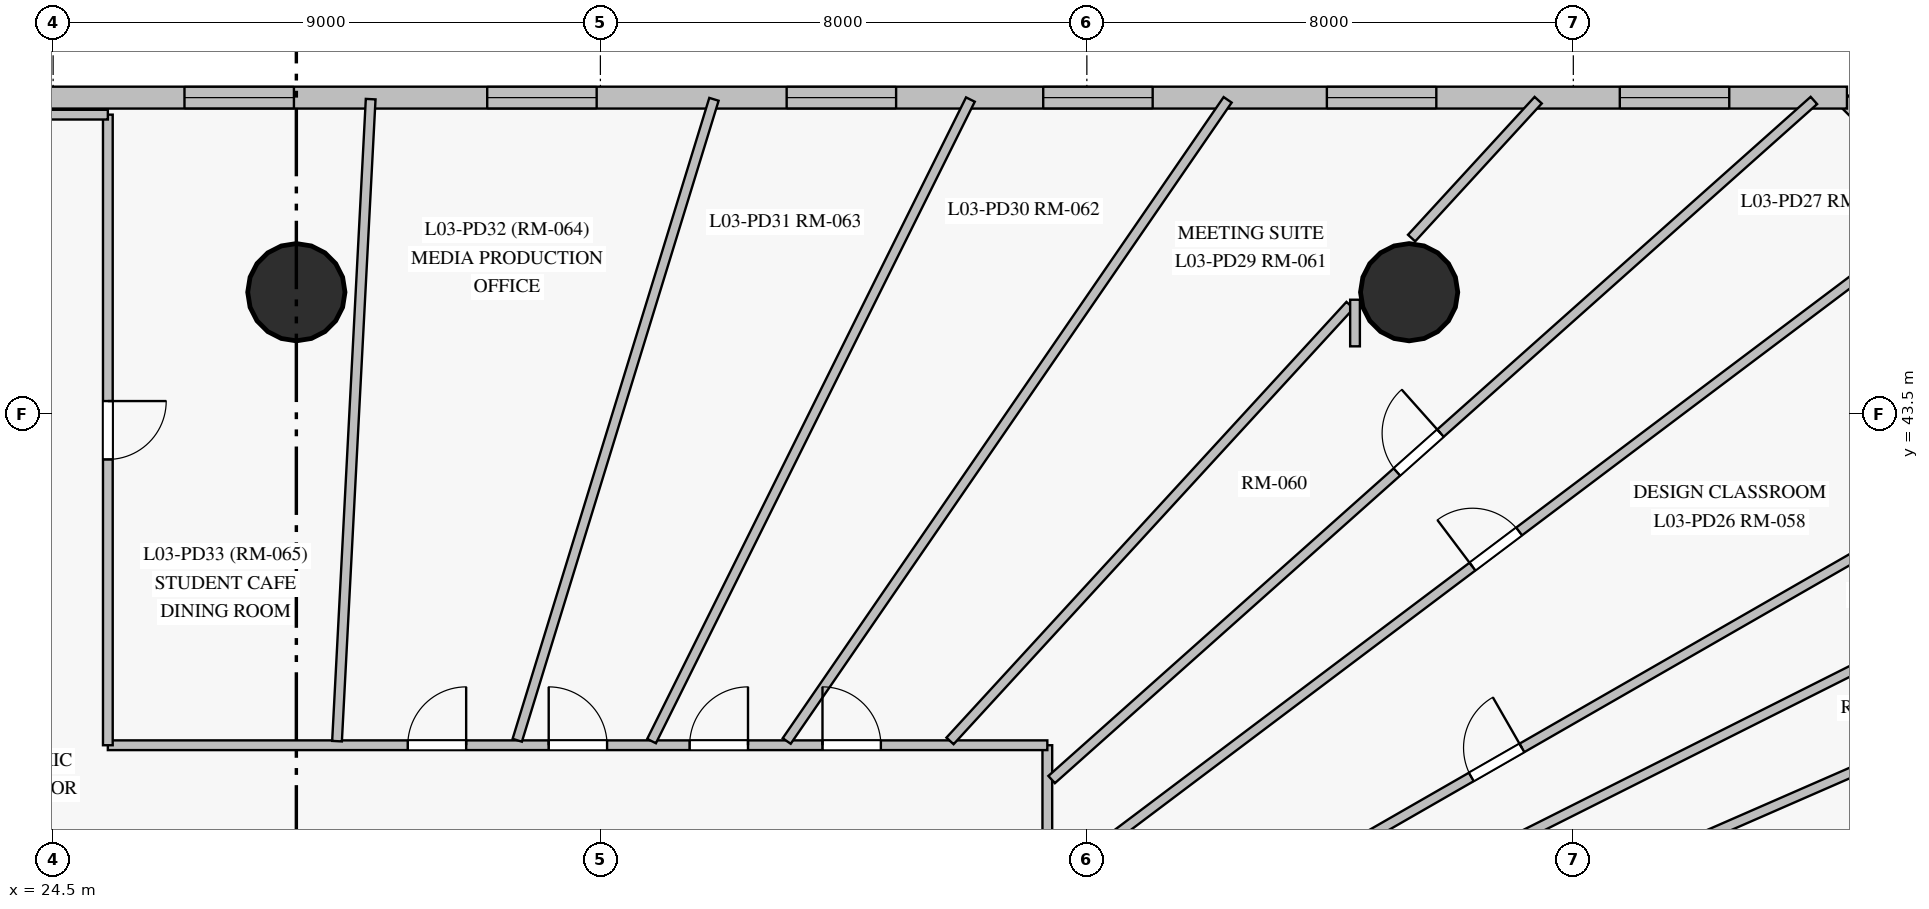
"""IFC4 building model, lengths in metres.
Left out: names, types, materials, properties, quantities, classifications, styles, units other than length and angle.
Written with IfcOpenShell. Run it as: python <this file> out.ifc"""

import sys

from ifc_helpers import new_model, si_unit, direction, frame, frame_2d, origin, origin_with_axes, origin_2d, place, context, subcontext, project, spatial, rectangle, circle, extrude, source, transform, mapped, element, fill, save


model = new_model("IFC4")
c1 = context("Model", 3, precision=1e-05, world=origin(), true_north=direction((0.0, 1.0)))
c2 = subcontext(c1, "Body", "Model", "MODEL_VIEW")
j1 = project(units=[si_unit("LENGTHUNIT", "METRE"), si_unit("PLANEANGLEUNIT", "RADIAN")], contexts=[c1])
p1 = place(None, origin())
s1 = spatial("IfcSite", under=j1, at=p1, CompositionType="ELEMENT")
p2 = place(p1, origin())
s2 = spatial("IfcBuilding", under=s1, at=p2, CompositionType="ELEMENT")
p3 = place(p2, frame((0.0, 0.0, 13.5)))
s3 = spatial("IfcBuildingStorey", under=s2, at=p3, CompositionType="ELEMENT", Elevation=13.5)
m1 = source(origin_with_axes(), c2, "Body", "SweptSolid", [
    extrude(circle(Radius=0.8, at=origin_2d()), origin(), (0.0, 0.0, 1.0), 4.5),
])
for number, where, z_axis, x_axis in (
    (1, (28.5, 45.5, 0.0), (0.0, 0.0, 1.0), (1.0, 0.0, 0.0)),
    (2, (46.8, 45.5, 0.0), (0.0, 0.0, 1.0), (1.0, 0.0, 0.0)),
):
    element("IfcColumn", number, at=place(p3, frame(where, z_axis=z_axis, x_axis=x_axis)), inside=s3, PredefinedType="COLUMN", context=c2, shape_type="MappedRepresentation", body=[
        mapped(m1, transform((0.0, 0.0, 0.0), scale=1.0)),
    ])
p4 = place(p3, frame((55.6, 47.1, 0.0), z_axis=(0.0, 0.0, 1.0), x_axis=(-0.707160727918, 0.707052830339, 0.0)))
e3 = element("IfcWall", 3, at=p4, inside=s3, PredefinedType="SOLIDWALL", context=c2, shape_type="SweptSolid", body=[
    extrude(rectangle(XDim=2.263, YDim=0.36, at=frame_2d((1.131, 0.0))), origin(), (0.0, 0.0, 1.0), 4.225),
])
p5 = place(p3, frame((54.0, 48.7, 0.0), z_axis=(0.0, 0.0, 1.0), x_axis=(-1.0, 0.0, 0.0)))
e4 = element("IfcWall", 4, at=p5, inside=s3, PredefinedType="SOLIDWALL", context=c2, shape_type="SweptSolid", body=[
    extrude(rectangle(XDim=46.8, YDim=0.36, at=frame_2d((23.4, 0.0))), origin(), (0.0, 0.0, 1.0), 4.225),
])
p6 = place(p5, frame((1.936, 0.0, 0.85)))
e5 = element("IfcOpeningElement", 5, at=p6, cuts=e4, PredefinedType="OPENING", context=c2, shape_type="SweptSolid", body=[
    extrude(rectangle(XDim=1.8, YDim=2.2, at=frame_2d((0.9, 1.1))), frame((0.0, 0.19, 0.0), z_axis=(0.0, -1.0, 0.0), x_axis=(1.0, 0.0, 0.0)), (0.0, 0.0, 1.0), 0.38),
])
p7 = place(p5, frame((6.753, 0.0, 0.85)))
e6 = element("IfcOpeningElement", 6, at=p7, cuts=e4, PredefinedType="OPENING", context=c2, shape_type="SweptSolid", body=[
    extrude(rectangle(XDim=1.8, YDim=2.2, at=frame_2d((0.9, 1.1))), frame((0.0, 0.19, 0.0), z_axis=(0.0, -1.0, 0.0), x_axis=(1.0, 0.0, 0.0)), (0.0, 0.0, 1.0), 0.38),
])
p8 = place(p5, frame((11.418, 0.0, 0.85)))
e7 = element("IfcOpeningElement", 7, at=p8, cuts=e4, PredefinedType="OPENING", context=c2, shape_type="SweptSolid", body=[
    extrude(rectangle(XDim=1.8, YDim=2.2, at=frame_2d((0.9, 1.1))), frame((0.0, 0.19, 0.0), z_axis=(0.0, -1.0, 0.0), x_axis=(1.0, 0.0, 0.0)), (0.0, 0.0, 1.0), 0.38),
])
p9 = place(p5, frame((15.637, 0.0, 0.85)))
e8 = element("IfcOpeningElement", 8, at=p9, cuts=e4, PredefinedType="OPENING", context=c2, shape_type="SweptSolid", body=[
    extrude(rectangle(XDim=1.8, YDim=2.2, at=frame_2d((0.9, 1.1))), frame((0.0, 0.19, 0.0), z_axis=(0.0, -1.0, 0.0), x_axis=(1.0, 0.0, 0.0)), (0.0, 0.0, 1.0), 0.38),
])
p10 = place(p5, frame((20.561, 0.0, 0.85)))
e9 = element("IfcOpeningElement", 9, at=p10, cuts=e4, PredefinedType="OPENING", context=c2, shape_type="SweptSolid", body=[
    extrude(rectangle(XDim=1.8, YDim=2.2, at=frame_2d((0.9, 1.1))), frame((0.0, 0.19, 0.0), z_axis=(0.0, -1.0, 0.0), x_axis=(1.0, 0.0, 0.0)), (0.0, 0.0, 1.0), 0.38),
])
p11 = place(p5, frame((25.54, 0.0, 0.85)))
e10 = element("IfcOpeningElement", 10, at=p11, cuts=e4, PredefinedType="OPENING", context=c2, shape_type="SweptSolid", body=[
    extrude(rectangle(XDim=1.8, YDim=2.2, at=frame_2d((0.9, 1.1))), frame((0.0, 0.19, 0.0), z_axis=(0.0, -1.0, 0.0), x_axis=(1.0, 0.0, 0.0)), (0.0, 0.0, 1.0), 0.38),
])
p12 = place(p5, frame((29.8, 0.0, 0.85)))
e11 = element("IfcOpeningElement", 11, at=p12, cuts=e4, PredefinedType="OPENING", context=c2, shape_type="SweptSolid", body=[
    extrude(rectangle(XDim=1.8, YDim=2.2, at=frame_2d((0.9, 1.1))), frame((0.0, 0.19, 0.0), z_axis=(0.0, -1.0, 0.0), x_axis=(1.0, 0.0, 0.0)), (0.0, 0.0, 1.0), 0.38),
])
p13 = place(p5, frame((35.709, 0.0, 0.85)))
e12 = element("IfcOpeningElement", 12, at=p13, cuts=e4, PredefinedType="OPENING", context=c2, shape_type="SweptSolid", body=[
    extrude(rectangle(XDim=1.8, YDim=2.2, at=frame_2d((0.9, 1.1))), frame((0.0, 0.19, 0.0), z_axis=(0.0, -1.0, 0.0), x_axis=(1.0, 0.0, 0.0)), (0.0, 0.0, 1.0), 0.38),
])
p14 = place(p5, frame((42.594, 0.0, 0.85)))
e13 = element("IfcOpeningElement", 13, at=p14, cuts=e4, PredefinedType="OPENING", context=c2, shape_type="SweptSolid", body=[
    extrude(rectangle(XDim=1.8, YDim=2.2, at=frame_2d((0.9, 1.1))), frame((0.0, 0.19, 0.0), z_axis=(0.0, -1.0, 0.0), x_axis=(1.0, 0.0, 0.0)), (0.0, 0.0, 1.0), 0.38),
])
p15 = place(p3, frame((40.85, 38.05, 0.0), z_axis=(0.0, 0.0, 1.0), x_axis=(0.0, -1.0, 0.0)))
e14 = element("IfcWall", 14, at=p15, inside=s3, PredefinedType="PARTITIONING", context=c2, shape_type="SweptSolid", body=[
    extrude(rectangle(XDim=18.508, YDim=0.16, at=frame_2d((9.254, 0.0))), origin(), (0.0, 0.0, 1.0), 3.275),
])
p16 = place(p15, frame((12.94, 0.0, 0.0)))
e15 = element("IfcOpeningElement", 15, at=p16, cuts=e14, PredefinedType="OPENING", context=c2, shape_type="SweptSolid", body=[
    extrude(rectangle(XDim=0.96, YDim=2.15, at=frame_2d((0.48, 1.075))), frame((0.0, 0.09, 0.0), z_axis=(0.0, -1.0, 0.0), x_axis=(1.0, 0.0, 0.0)), (0.0, 0.0, 1.0), 0.18),
])
p17 = place(p15, frame((11.006, 0.0, 0.0)))
e16 = element("IfcOpeningElement", 16, at=p17, cuts=e14, PredefinedType="OPENING", context=c2, shape_type="SweptSolid", body=[
    extrude(rectangle(XDim=0.96, YDim=2.15, at=frame_2d((0.48, 1.075))), frame((0.0, 0.09, 0.0), z_axis=(0.0, -1.0, 0.0), x_axis=(1.0, 0.0, 0.0)), (0.0, 0.0, 1.0), 0.18),
])
p18 = place(p15, frame((8.695, 0.0, 0.0)))
e17 = element("IfcOpeningElement", 17, at=p18, cuts=e14, PredefinedType="OPENING", context=c2, shape_type="SweptSolid", body=[
    extrude(rectangle(XDim=0.96, YDim=2.15, at=frame_2d((0.48, 1.075))), frame((0.0, 0.09, 0.0), z_axis=(0.0, -1.0, 0.0), x_axis=(1.0, 0.0, 0.0)), (0.0, 0.0, 1.0), 0.18),
])
p19 = place(p15, frame((6.434, 0.0, 0.0)))
e18 = element("IfcOpeningElement", 18, at=p19, cuts=e14, PredefinedType="OPENING", context=c2, shape_type="SweptSolid", body=[
    extrude(rectangle(XDim=0.96, YDim=2.15, at=frame_2d((0.48, 1.075))), frame((0.0, 0.09, 0.0), z_axis=(0.0, -1.0, 0.0), x_axis=(1.0, 0.0, 0.0)), (0.0, 0.0, 1.0), 0.18),
])
p20 = place(p15, frame((3.02, 0.0, 0.0)))
e19 = element("IfcOpeningElement", 19, at=p20, cuts=e14, PredefinedType="OPENING", context=c2, shape_type="SweptSolid", body=[
    extrude(rectangle(XDim=0.96, YDim=2.15, at=frame_2d((0.48, 1.075))), frame((0.0, 0.09, 0.0), z_axis=(0.0, -1.0, 0.0), x_axis=(1.0, 0.0, 0.0)), (0.0, 0.0, 1.0), 0.18),
])
p21 = place(p3, frame((40.92, 35.776, 0.0), z_axis=(0.0, 0.0, 1.0), x_axis=(0.798876492125, 0.601495095848, 0.0)))
e20 = element("IfcWall", 20, at=p21, inside=s3, PredefinedType="PARTITIONING", context=c2, shape_type="SweptSolid", body=[
    extrude(rectangle(XDim=18.328, YDim=0.16, at=frame_2d((9.164, 0.0))), origin(), (0.0, 0.0, 1.0), 4.225),
])
p22 = place(p21, frame((8.664, 0.0, 0.0)))
e21 = element("IfcOpeningElement", 21, at=p22, cuts=e20, PredefinedType="OPENING", context=c2, shape_type="SweptSolid", body=[
    extrude(rectangle(XDim=0.96, YDim=2.15, at=frame_2d((0.48, 1.075))), frame((0.0, 0.09, 0.0), z_axis=(0.0, -1.0, 0.0), x_axis=(1.0, 0.0, 0.0)), (0.0, 0.0, 1.0), 0.18),
])
p23 = place(p3, frame((40.932, 33.571, 0.0), z_axis=(0.0, 0.0, 1.0), x_axis=(0.867157652111, 0.498033740207, 0.0)))
e22 = element("IfcWall", 22, at=p23, inside=s3, PredefinedType="PARTITIONING", context=c2, shape_type="SweptSolid", body=[
    extrude(rectangle(XDim=16.876, YDim=0.16, at=frame_2d((8.438, 0.0))), origin(), (0.0, 0.0, 1.0), 4.225),
])
p24 = place(p23, frame((7.946, 0.0, 0.0)))
e23 = element("IfcOpeningElement", 23, at=p24, cuts=e22, PredefinedType="OPENING", context=c2, shape_type="SweptSolid", body=[
    extrude(rectangle(XDim=0.96, YDim=2.15, at=frame_2d((0.48, 1.075))), frame((0.0, 0.09, 0.0), z_axis=(0.0, -1.0, 0.0), x_axis=(1.0, 0.0, 0.0)), (0.0, 0.0, 1.0), 0.18),
])
p25 = place(p3, frame((40.921, 37.485, 0.0), z_axis=(0.0, 0.0, 1.0), x_axis=(0.746657873384, 0.665208253191, 0.0)))
e24 = element("IfcWall", 24, at=p25, inside=s3, PredefinedType="PARTITIONING", context=c2, shape_type="SweptSolid", body=[
    extrude(rectangle(XDim=16.789, YDim=0.16, at=frame_2d((8.394, 0.0))), origin(), (0.0, 0.0, 1.0), 4.225),
])
p26 = place(p25, frame((7.604, 0.0, 0.0)))
e25 = element("IfcOpeningElement", 25, at=p26, cuts=e24, PredefinedType="OPENING", context=c2, shape_type="SweptSolid", body=[
    extrude(rectangle(XDim=0.96, YDim=2.15, at=frame_2d((0.48, 1.075))), frame((0.0, 0.09, 0.0), z_axis=(0.0, -1.0, 0.0), x_axis=(1.0, 0.0, 0.0)), (0.0, 0.0, 1.0), 0.18),
])
p27 = place(p3, frame((40.932, 32.677, 0.0), z_axis=(0.0, 0.0, 1.0), x_axis=(0.893608855562, 0.448846536425, 0.0)))
e26 = element("IfcWall", 26, at=p27, inside=s3, PredefinedType="PARTITIONING", context=c2, shape_type="SweptSolid", body=[
    extrude(rectangle(XDim=16.379, YDim=0.16, at=frame_2d((8.189, 0.0))), origin(), (0.0, 0.0, 1.0), 4.225),
])
p28 = place(p3, frame((40.918, 31.859, 0.0), z_axis=(0.0, 0.0, 1.0), x_axis=(0.91638288518, 0.400302895004, 0.0)))
e27 = element("IfcWall", 27, at=p28, inside=s3, PredefinedType="PARTITIONING", context=c2, shape_type="SweptSolid", body=[
    extrude(rectangle(XDim=15.988, YDim=0.16, at=frame_2d((7.994, 0.0))), origin(), (0.0, 0.0, 1.0), 4.225),
])
p29 = place(p28, frame((7.494, 0.0, 0.0)))
e28 = element("IfcOpeningElement", 28, at=p29, cuts=e27, PredefinedType="OPENING", context=c2, shape_type="SweptSolid", body=[
    extrude(rectangle(XDim=0.96, YDim=2.15, at=frame_2d((0.48, 1.075))), frame((0.0, 0.09, 0.0), z_axis=(0.0, -1.0, 0.0), x_axis=(1.0, 0.0, 0.0)), (0.0, 0.0, 1.0), 0.18),
])
p30 = place(p3, frame((25.4, 38.05, 0.0), z_axis=(0.0, 0.0, 1.0), x_axis=(1.0, 0.0, 0.0)))
e29 = element("IfcWall", 29, at=p30, inside=s3, PredefinedType="PARTITIONING", context=c2, shape_type="SweptSolid", body=[
    extrude(rectangle(XDim=15.45, YDim=0.16, at=frame_2d((7.725, 0.0))), origin(), (0.0, 0.0, 1.0), 4.225),
])
p31 = place(p30, frame((11.752, 0.0, 0.0)))
e30 = element("IfcOpeningElement", 30, at=p31, cuts=e29, PredefinedType="OPENING", context=c2, shape_type="SweptSolid", body=[
    extrude(rectangle(XDim=0.96, YDim=2.15, at=frame_2d((0.48, 1.075))), frame((0.0, 0.09, 0.0), z_axis=(0.0, -1.0, 0.0), x_axis=(1.0, 0.0, 0.0)), (0.0, 0.0, 1.0), 0.18),
])
p32 = place(p30, frame((9.567, 0.0, 0.0)))
e31 = element("IfcOpeningElement", 31, at=p32, cuts=e29, PredefinedType="OPENING", context=c2, shape_type="SweptSolid", body=[
    extrude(rectangle(XDim=0.96, YDim=2.15, at=frame_2d((0.48, 1.075))), frame((0.0, 0.09, 0.0), z_axis=(0.0, -1.0, 0.0), x_axis=(1.0, 0.0, 0.0)), (0.0, 0.0, 1.0), 0.18),
])
p33 = place(p30, frame((7.25, 0.0, 0.0)))
e32 = element("IfcOpeningElement", 32, at=p33, cuts=e29, PredefinedType="OPENING", context=c2, shape_type="SweptSolid", body=[
    extrude(rectangle(XDim=0.96, YDim=2.15, at=frame_2d((0.48, 1.075))), frame((0.0, 0.09, 0.0), z_axis=(0.0, -1.0, 0.0), x_axis=(1.0, 0.0, 0.0)), (0.0, 0.0, 1.0), 0.18),
])
p34 = place(p30, frame((4.933, 0.0, 0.0)))
e33 = element("IfcOpeningElement", 33, at=p34, cuts=e29, PredefinedType="OPENING", context=c2, shape_type="SweptSolid", body=[
    extrude(rectangle(XDim=0.96, YDim=2.15, at=frame_2d((0.48, 1.075))), frame((0.0, 0.09, 0.0), z_axis=(0.0, -1.0, 0.0), x_axis=(1.0, 0.0, 0.0)), (0.0, 0.0, 1.0), 0.18),
])
p35 = place(p3, frame((36.564, 38.12, 0.0), z_axis=(0.0, 0.0, 1.0), x_axis=(0.566648651746, 0.823959529027, 0.0)))
e34 = element("IfcWall", 34, at=p35, inside=s3, PredefinedType="PARTITIONING", context=c2, shape_type="SweptSolid", body=[
    extrude(rectangle(XDim=12.797, YDim=0.16, at=frame_2d((6.398, 0.0))), origin(), (0.0, 0.0, 1.0), 4.225),
])
p36 = place(p3, frame((34.342, 38.119, 0.0), z_axis=(0.0, 0.0, 1.0), x_axis=(0.445081935211, 0.895489849718, 0.0)))
e35 = element("IfcWall", 35, at=p36, inside=s3, PredefinedType="PARTITIONING", context=c2, shape_type="SweptSolid", body=[
    extrude(rectangle(XDim=11.781, YDim=0.16, at=frame_2d((5.89, 0.0))), origin(), (0.0, 0.0, 1.0), 4.225),
])
p37 = place(p3, frame((32.133, 38.132, 0.0), z_axis=(0.0, 0.0, 1.0), x_axis=(0.293383988776, 0.955994683631, 0.0)))
e36 = element("IfcWall", 36, at=p37, inside=s3, PredefinedType="PARTITIONING", context=c2, shape_type="SweptSolid", body=[
    extrude(rectangle(XDim=11.025, YDim=0.16, at=frame_2d((5.513, 0.0))), origin(), (0.0, 0.0, 1.0), 4.225),
])
p38 = place(p3, frame((29.169, 38.117, 0.0), z_axis=(0.0, 0.0, 1.0), x_axis=(0.052326127108, 0.998630049829, 0.0)))
e37 = element("IfcWall", 37, at=p38, inside=s3, PredefinedType="PARTITIONING", context=c2, shape_type="SweptSolid", body=[
    extrude(rectangle(XDim=10.573, YDim=0.16, at=frame_2d((5.286, 0.0))), origin(), (0.0, 0.0, 1.0), 4.225),
])
p39 = place(p3, frame((25.4, 48.42, 0.0), z_axis=(0.0, 0.0, 1.0), x_axis=(0.0, -1.0, 0.0)))
e38 = element("IfcWall", 38, at=p39, inside=s3, PredefinedType="PARTITIONING", context=c2, shape_type="SweptSolid", body=[
    extrude(rectangle(XDim=10.37, YDim=0.16, at=frame_2d((5.185, 0.0))), origin(), (0.0, 0.0, 1.0), 4.225),
])
p40 = place(p39, frame((4.71, 0.0, 0.0)))
e39 = element("IfcOpeningElement", 39, at=p40, cuts=e38, PredefinedType="OPENING", context=c2, shape_type="SweptSolid", body=[
    extrude(rectangle(XDim=0.96, YDim=2.15, at=frame_2d((0.48, 1.075))), frame((0.0, 0.09, 0.0), z_axis=(0.0, -1.0, 0.0), x_axis=(1.0, 0.0, 0.0)), (0.0, 0.0, 1.0), 0.18),
])
p41 = place(p3, frame((39.25, 38.121, 0.0), z_axis=(0.0, 0.0, 1.0), x_axis=(0.676243830609, 0.736677868246, 0.0)))
e40 = element("IfcWall", 40, at=p41, inside=s3, PredefinedType="PARTITIONING", context=c2, shape_type="SweptSolid", body=[
    extrude(rectangle(XDim=9.728, YDim=0.16, at=frame_2d((4.864, 0.0))), origin(), (0.0, 0.0, 1.0), 3.275),
])
p42 = place(p3, frame((21.2, 48.42, 0.0), z_axis=(0.0, 0.0, 1.0), x_axis=(1.0, 0.0, 0.0)))
e41 = element("IfcWall", 41, at=p42, inside=s3, PredefinedType="PARTITIONING", context=c2, shape_type="SweptSolid", body=[
    extrude(rectangle(XDim=4.2, YDim=0.16, at=frame_2d((2.1, 0.0))), origin(), (0.0, 0.0, 1.0), 4.225),
])
p43 = place(p3, frame((46.841, 46.39, 0.0), z_axis=(0.0, 0.0, 1.0), x_axis=(0.67620568134, 0.736712886085, 0.0)))
e42 = element("IfcWall", 42, at=p43, inside=s3, PredefinedType="PARTITIONING", context=c2, shape_type="SweptSolid", body=[
    extrude(rectangle(XDim=3.079, YDim=0.16, at=frame_2d((1.539, 0.0))), origin(), (0.0, 0.0, 1.0), 4.225),
])
p44 = place(p3, frame((45.91, 45.376, 0.0), z_axis=(0.0, 0.0, 1.0), x_axis=(0.0, -1.0, 0.0)))
e43 = element("IfcWall", 43, at=p44, inside=s3, PredefinedType="PARTITIONING", context=c2, shape_type="SweptSolid", body=[
    extrude(rectangle(XDim=0.766, YDim=0.16, at=frame_2d((0.383, 0.0))), origin(), (0.0, 0.0, 1.0), 3.275),
])
m2 = source(origin_with_axes(), c2, "Body", "SweptSolid", [
    extrude(rectangle(XDim=1.8, YDim=2.2, at=frame_2d((0.9, 1.1))), frame((0.0, 0.03, 0.0), z_axis=(0.0, -1.0, 0.0), x_axis=(1.0, 0.0, 0.0)), (0.0, 0.0, 1.0), 0.06),
])
p45 = place(p6, origin())
e44 = element("IfcWindow", 44, at=p45, inside=s3, PartitioningType="SINGLE_PANEL", PredefinedType="WINDOW", context=c2, shape_type="MappedRepresentation", body=[
    mapped(m2, transform((0.0, 0.0, 0.0), scale=1.0)),
])
fill(e5, e44)
p46 = place(p7, origin())
e45 = element("IfcWindow", 45, at=p46, inside=s3, PartitioningType="SINGLE_PANEL", PredefinedType="WINDOW", context=c2, shape_type="MappedRepresentation", body=[
    mapped(m2, transform((0.0, 0.0, 0.0), scale=1.0)),
])
fill(e6, e45)
p47 = place(p8, origin())
e46 = element("IfcWindow", 46, at=p47, inside=s3, PartitioningType="SINGLE_PANEL", PredefinedType="WINDOW", context=c2, shape_type="MappedRepresentation", body=[
    mapped(m2, transform((0.0, 0.0, 0.0), scale=1.0)),
])
fill(e7, e46)
p48 = place(p9, origin())
e47 = element("IfcWindow", 47, at=p48, inside=s3, PartitioningType="SINGLE_PANEL", PredefinedType="WINDOW", context=c2, shape_type="MappedRepresentation", body=[
    mapped(m2, transform((0.0, 0.0, 0.0), scale=1.0)),
])
fill(e8, e47)
p49 = place(p10, origin())
e48 = element("IfcWindow", 48, at=p49, inside=s3, PartitioningType="SINGLE_PANEL", PredefinedType="WINDOW", context=c2, shape_type="MappedRepresentation", body=[
    mapped(m2, transform((0.0, 0.0, 0.0), scale=1.0)),
])
fill(e9, e48)
p50 = place(p11, origin())
e49 = element("IfcWindow", 49, at=p50, inside=s3, PartitioningType="SINGLE_PANEL", PredefinedType="WINDOW", context=c2, shape_type="MappedRepresentation", body=[
    mapped(m2, transform((0.0, 0.0, 0.0), scale=1.0)),
])
fill(e10, e49)
m3 = source(origin_with_axes(), c2, "Body", "SweptSolid", [
    extrude(rectangle(XDim=0.96, YDim=2.15, at=frame_2d((0.48, 1.075))), frame((0.0, 0.025, 0.0), z_axis=(0.0, -1.0, 0.0), x_axis=(1.0, 0.0, 0.0)), (0.0, 0.0, 1.0), 0.05),
])
p51 = place(p24, origin())
e50 = element("IfcDoor", 50, at=p51, inside=s3, OperationType="SINGLE_SWING_RIGHT", PredefinedType="DOOR", context=c2, shape_type="MappedRepresentation", body=[
    mapped(m3, transform((0.0, 0.0, 0.0), scale=1.0)),
])
fill(e23, e50)
p52 = place(p22, origin())
e51 = element("IfcDoor", 51, at=p52, inside=s3, OperationType="SINGLE_SWING_LEFT", PredefinedType="DOOR", context=c2, shape_type="MappedRepresentation", body=[
    mapped(m3, transform((0.0, 0.0, 0.0), scale=1.0)),
])
fill(e21, e51)
p53 = place(p26, origin())
e52 = element("IfcDoor", 52, at=p53, inside=s3, OperationType="SINGLE_SWING_RIGHT", PredefinedType="DOOR", context=c2, shape_type="MappedRepresentation", body=[
    mapped(m3, transform((0.0, 0.0, 0.0), scale=1.0)),
])
fill(e25, e52)
p54 = place(p31, origin())
e53 = element("IfcDoor", 53, at=p54, inside=s3, OperationType="SINGLE_SWING_LEFT", PredefinedType="DOOR", context=c2, shape_type="MappedRepresentation", body=[
    mapped(m3, transform((0.0, 0.0, 0.0), scale=1.0)),
])
fill(e30, e53)
p55 = place(p32, origin())
e54 = element("IfcDoor", 54, at=p55, inside=s3, OperationType="SINGLE_SWING_RIGHT", PredefinedType="DOOR", context=c2, shape_type="MappedRepresentation", body=[
    mapped(m3, transform((0.0, 0.0, 0.0), scale=1.0)),
])
fill(e31, e54)
p56 = place(p33, origin())
e55 = element("IfcDoor", 55, at=p56, inside=s3, OperationType="SINGLE_SWING_LEFT", PredefinedType="DOOR", context=c2, shape_type="MappedRepresentation", body=[
    mapped(m3, transform((0.0, 0.0, 0.0), scale=1.0)),
])
fill(e32, e55)
p57 = place(p34, origin())
e56 = element("IfcDoor", 56, at=p57, inside=s3, OperationType="SINGLE_SWING_RIGHT", PredefinedType="DOOR", context=c2, shape_type="MappedRepresentation", body=[
    mapped(m3, transform((0.0, 0.0, 0.0), scale=1.0)),
])
fill(e33, e56)
p58 = place(p40, origin())
e57 = element("IfcDoor", 57, at=p58, inside=s3, OperationType="SINGLE_SWING_LEFT", PredefinedType="DOOR", context=c2, shape_type="MappedRepresentation", body=[
    mapped(m3, transform((0.0, 0.0, 0.0), scale=1.0)),
])
fill(e39, e57)
save(model, sys.argv[1])
